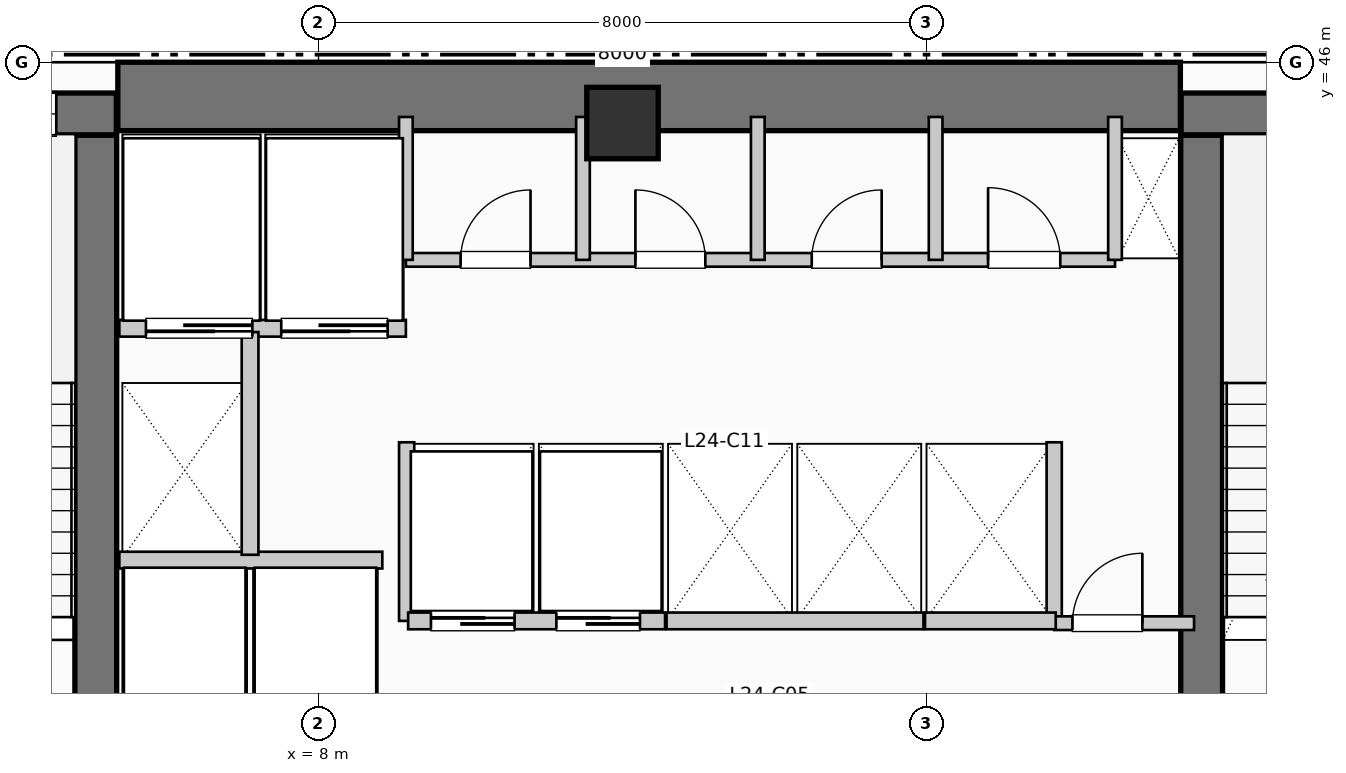
"""IFC4 building model, lengths in metres.
Left out: names, types, materials, properties, quantities, classifications, styles, units other than length and angle.
Written with IfcOpenShell. Run it as: python <this file> out.ifc"""

import sys

from ifc_helpers import new_model, si_unit, direction, frame, frame_2d, origin, origin_2d, place, context, subcontext, project, spatial, rectangle, extrude, element, fill, save


model = new_model("IFC4")
c1 = context("Model", 3, precision=1e-05, world=origin(), true_north=direction((0.0, 1.0)))
c2 = subcontext(c1, "Body", "Model", "MODEL_VIEW")
j1 = project(units=[si_unit("LENGTHUNIT", "METRE"), si_unit("PLANEANGLEUNIT", "RADIAN")], contexts=[c1])
p1 = place(None, origin())
s1 = spatial("IfcSite", under=j1, at=p1, CompositionType="ELEMENT")
p2 = place(p1, origin())
s2 = spatial("IfcBuilding", under=s1, at=p2, CompositionType="ELEMENT")
p3 = place(p2, frame((0.0, 0.0, 102.63)))
s3 = spatial("IfcBuildingStorey", under=s2, at=p3, CompositionType="ELEMENT", Elevation=102.63)
p4 = place(p3, frame((5.36, 45.55, 0.0), z_axis=(0.0, 0.0, 1.0), x_axis=(1.0, 0.0, 0.0)))
e1 = element("IfcWall", 1, at=p4, inside=s3, PredefinedType="SHEAR", context=c2, shape_type="SweptSolid", body=[
    extrude(rectangle(XDim=13.98, YDim=0.9, at=frame_2d((6.99, 0.0))), origin(), (0.0, 0.0, 1.0), 3.96),
])
p5 = place(p3, frame((5.07, 37.15, 0.0), z_axis=(0.0, 0.0, 1.0), x_axis=(0.0, 1.0, 0.0)))
e2 = element("IfcWall", 2, at=p5, inside=s3, PredefinedType="SHEAR", context=c2, shape_type="SweptSolid", body=[
    extrude(rectangle(XDim=7.89, YDim=0.55, at=frame_2d((3.945, 0.0))), origin(), (0.0, 0.0, 1.0), 3.96),
])
p6 = place(p3, frame((1.1, 45.32, 0.0), z_axis=(0.0, 0.0, 1.0), x_axis=(1.0, 0.0, 0.0)))
e3 = element("IfcWall", 3, at=p6, inside=s3, PredefinedType="SHEAR", context=c2, shape_type="SweptSolid", body=[
    extrude(rectangle(XDim=4.24, YDim=0.55, at=frame_2d((2.12, 0.0))), origin(), (0.0, 0.0, 1.0), 3.96),
])
p7 = place(p6, frame((2.05, 0.0, 1.05)))
e4 = element("IfcOpeningElement", 4, at=p7, cuts=e3, PredefinedType="OPENING", context=c2, shape_type="SweptSolid", body=[
    extrude(rectangle(XDim=1.4, YDim=1.8, at=frame_2d((0.7, 0.9))), frame((0.0, 0.285, 0.0), z_axis=(0.0, -1.0, 0.0), x_axis=(1.0, 0.0, 0.0)), (0.0, 0.0, 1.0), 0.57),
])
p8 = place(p3, frame((19.62, 37.15, 0.0), z_axis=(0.0, 0.0, 1.0), x_axis=(0.0, 1.0, 0.0)))
e5 = element("IfcWall", 5, at=p8, inside=s3, PredefinedType="SHEAR", context=c2, shape_type="SweptSolid", body=[
    extrude(rectangle(XDim=7.89, YDim=0.55, at=frame_2d((3.945, 0.0))), origin(), (0.0, 0.0, 1.0), 3.96),
])
p9 = place(p3, frame((19.35, 45.32, 0.0), z_axis=(0.0, 0.0, 1.0), x_axis=(1.0, 0.0, 0.0)))
e6 = element("IfcWall", 6, at=p9, inside=s3, PredefinedType="SHEAR", context=c2, shape_type="SweptSolid", body=[
    extrude(rectangle(XDim=3.69, YDim=0.55, at=frame_2d((1.845, 0.0))), origin(), (0.0, 0.0, 1.0), 3.96),
])
p10 = place(p9, frame((1.15, 0.0, 1.05)))
e7 = element("IfcOpeningElement", 7, at=p10, cuts=e6, PredefinedType="OPENING", context=c2, shape_type="SweptSolid", body=[
    extrude(rectangle(XDim=1.4, YDim=1.8, at=frame_2d((0.7, 0.9))), frame((0.0, 0.285, 0.0), z_axis=(0.0, -1.0, 0.0), x_axis=(1.0, 0.0, 0.0)), (0.0, 0.0, 1.0), 0.57),
])
p11 = place(p3, frame((12.0, 45.2, 0.0), z_axis=(0.0, 0.0, 1.0), x_axis=(1.0, 0.0, 0.0)))
e8 = element("IfcColumn", 8, at=p11, inside=s3, PredefinedType="COLUMN", context=c2, shape_type="SweptSolid", body=[
    extrude(rectangle(XDim=0.94, YDim=0.94, at=origin_2d()), origin(), (0.0, 0.0, 1.0), 3.96),
])
p12 = place(p3, frame((5.38, 39.45, 0.0), z_axis=(0.0, 0.0, 1.0), x_axis=(1.0, 0.0, 0.0)))
e9 = element("IfcWall", 9, at=p12, inside=s3, PredefinedType="PARTITIONING", context=c2, shape_type="SweptSolid", body=[
    extrude(rectangle(XDim=3.46, YDim=0.22, at=frame_2d((1.73, 0.0))), origin(), (0.0, 0.0, 1.0), 3.71),
])
p13 = place(p3, frame((5.38, 42.5, 0.0), z_axis=(0.0, 0.0, 1.0), x_axis=(1.0, 0.0, 0.0)))
e10 = element("IfcWall", 10, at=p13, inside=s3, PredefinedType="PARTITIONING", context=c2, shape_type="SweptSolid", body=[
    extrude(rectangle(XDim=3.77, YDim=0.22, at=frame_2d((1.885, 0.0))), origin(), (0.0, 0.0, 1.0), 3.71),
])
p14 = place(p13, frame((1.75, 0.0, 0.0), z_axis=(0.0, 0.0, 1.0), x_axis=(-1.0, 0.0, 0.0)))
e11 = element("IfcOpeningElement", 11, at=p14, cuts=e10, PredefinedType="OPENING", context=c2, shape_type="SweptSolid", body=[
    extrude(rectangle(XDim=1.4, YDim=2.2, at=frame_2d((0.7, 1.1))), frame((0.0, 0.12, 0.0), z_axis=(0.0, -1.0, 0.0), x_axis=(1.0, 0.0, 0.0)), (0.0, 0.0, 1.0), 0.24),
])
p15 = place(p13, frame((3.53, 0.0, 0.0), z_axis=(0.0, 0.0, 1.0), x_axis=(-1.0, 0.0, 0.0)))
e12 = element("IfcOpeningElement", 12, at=p15, cuts=e10, PredefinedType="OPENING", context=c2, shape_type="SweptSolid", body=[
    extrude(rectangle(XDim=1.4, YDim=2.2, at=frame_2d((0.7, 1.1))), frame((0.0, 0.12, 0.0), z_axis=(0.0, -1.0, 0.0), x_axis=(1.0, 0.0, 0.0)), (0.0, 0.0, 1.0), 0.24),
])
p16 = place(p3, frame((7.1, 39.52, 0.0), z_axis=(0.0, 0.0, 1.0), x_axis=(0.0, 1.0, 0.0)))
e13 = element("IfcWall", 13, at=p16, inside=s3, PredefinedType="PARTITIONING", context=c2, shape_type="SweptSolid", body=[
    extrude(rectangle(XDim=2.93, YDim=0.22, at=frame_2d((1.465, 0.0))), origin(), (0.0, 0.0, 1.0), 3.71),
])
for number, where, z_axis, x_axis in (
    (14, (9.16, 38.65, 0.0), (0.0, 0.0, 1.0), (0.0, 1.0, 0.0)),
    (15, (17.68, 38.65, 0.0), (0.0, 0.0, 1.0), (0.0, 1.0, 0.0)),
):
    element("IfcWall", number, at=place(p3, frame(where, z_axis=z_axis, x_axis=x_axis)), inside=s3, PredefinedType="PARTITIONING", context=c2, shape_type="SweptSolid", body=[
        extrude(rectangle(XDim=2.35, YDim=0.2, at=frame_2d((1.175, 0.0))), origin(), (0.0, 0.0, 1.0), 3.71),
    ])
p17 = place(p3, frame((17.68, 38.62, 0.0), z_axis=(0.0, 0.0, 1.0), x_axis=(1.0, 0.0, 0.0)))
e16 = element("IfcWall", 16, at=p17, inside=s3, PredefinedType="PARTITIONING", context=c2, shape_type="SweptSolid", body=[
    extrude(rectangle(XDim=1.84, YDim=0.18, at=frame_2d((0.92, 0.0))), origin(), (0.0, 0.0, 1.0), 3.71),
])
p18 = place(p17, frame((0.24, 0.0, 0.0)))
e17 = element("IfcOpeningElement", 17, at=p18, cuts=e16, PredefinedType="OPENING", context=c2, shape_type="SweptSolid", body=[
    extrude(rectangle(XDim=0.92, YDim=2.1, at=frame_2d((0.46, 1.05))), frame((0.0, 0.1, 0.0), z_axis=(0.0, -1.0, 0.0), x_axis=(1.0, 0.0, 0.0)), (0.0, 0.0, 1.0), 0.2),
])
p19 = place(p3, frame((9.18, 38.65, 0.0), z_axis=(0.0, 0.0, 1.0), x_axis=(1.0, 0.0, 0.0)))
e18 = element("IfcWall", 18, at=p19, inside=s3, PredefinedType="PARTITIONING", context=c2, shape_type="SweptSolid", body=[
    extrude(rectangle(XDim=3.38, YDim=0.22, at=frame_2d((1.69, 0.0))), origin(), (0.0, 0.0, 1.0), 3.71),
])
p20 = place(p19, frame((0.3, 0.0, 0.0)))
e19 = element("IfcOpeningElement", 19, at=p20, cuts=e18, PredefinedType="OPENING", context=c2, shape_type="SweptSolid", body=[
    extrude(rectangle(XDim=1.1, YDim=2.2, at=frame_2d((0.55, 1.1))), frame((0.0, 0.12, 0.0), z_axis=(0.0, -1.0, 0.0), x_axis=(1.0, 0.0, 0.0)), (0.0, 0.0, 1.0), 0.24),
])
p21 = place(p19, frame((1.95, 0.0, 0.0)))
e20 = element("IfcOpeningElement", 20, at=p21, cuts=e18, PredefinedType="OPENING", context=c2, shape_type="SweptSolid", body=[
    extrude(rectangle(XDim=1.1, YDim=2.2, at=frame_2d((0.55, 1.1))), frame((0.0, 0.12, 0.0), z_axis=(0.0, -1.0, 0.0), x_axis=(1.0, 0.0, 0.0)), (0.0, 0.0, 1.0), 0.24),
])
p22 = place(p3, frame((12.58, 38.65, 0.0), z_axis=(0.0, 0.0, 1.0), x_axis=(1.0, 0.0, 0.0)))
e21 = element("IfcWall", 21, at=p22, inside=s3, PredefinedType="PARTITIONING", context=c2, shape_type="SweptSolid", body=[
    extrude(rectangle(XDim=3.38, YDim=0.22, at=frame_2d((1.69, 0.0))), origin(), (0.0, 0.0, 1.0), 3.71),
])
p23 = place(p3, frame((15.98, 38.65, 0.0), z_axis=(0.0, 0.0, 1.0), x_axis=(1.0, 0.0, 0.0)))
e22 = element("IfcWall", 22, at=p23, inside=s3, PredefinedType="PARTITIONING", context=c2, shape_type="SweptSolid", body=[
    extrude(rectangle(XDim=1.72, YDim=0.22, at=frame_2d((0.86, 0.0))), origin(), (0.0, 0.0, 1.0), 3.71),
])
p24 = place(p3, frame((9.15, 43.4, 0.0), z_axis=(0.0, 0.0, 1.0), x_axis=(1.0, 0.0, 0.0)))
e23 = element("IfcWall", 23, at=p24, inside=s3, PredefinedType="PLUMBINGWALL", context=c2, shape_type="SweptSolid", body=[
    extrude(rectangle(XDim=9.33, YDim=0.18, at=frame_2d((4.665, 0.0))), origin(), (0.0, 0.0, 1.0), 3.71),
])
p25 = place(p24, frame((0.72, 0.0, 0.0)))
e24 = element("IfcOpeningElement", 24, at=p25, cuts=e23, PredefinedType="OPENING", context=c2, shape_type="SweptSolid", body=[
    extrude(rectangle(XDim=0.92, YDim=2.1, at=frame_2d((0.46, 1.05))), frame((0.0, 0.1, 0.0), z_axis=(0.0, -1.0, 0.0), x_axis=(1.0, 0.0, 0.0)), (0.0, 0.0, 1.0), 0.2),
])
p26 = place(p24, frame((3.02, 0.0, 0.0)))
e25 = element("IfcOpeningElement", 25, at=p26, cuts=e23, PredefinedType="OPENING", context=c2, shape_type="SweptSolid", body=[
    extrude(rectangle(XDim=0.92, YDim=2.1, at=frame_2d((0.46, 1.05))), frame((0.0, 0.1, 0.0), z_axis=(0.0, -1.0, 0.0), x_axis=(1.0, 0.0, 0.0)), (0.0, 0.0, 1.0), 0.2),
])
p27 = place(p24, frame((5.34, 0.0, 0.0)))
e26 = element("IfcOpeningElement", 26, at=p27, cuts=e23, PredefinedType="OPENING", context=c2, shape_type="SweptSolid", body=[
    extrude(rectangle(XDim=0.92, YDim=2.1, at=frame_2d((0.46, 1.05))), frame((0.0, 0.1, 0.0), z_axis=(0.0, -1.0, 0.0), x_axis=(1.0, 0.0, 0.0)), (0.0, 0.0, 1.0), 0.2),
])
p28 = place(p24, frame((7.66, 0.0, 0.0)))
e27 = element("IfcOpeningElement", 27, at=p28, cuts=e23, PredefinedType="OPENING", context=c2, shape_type="SweptSolid", body=[
    extrude(rectangle(XDim=0.95, YDim=2.1, at=frame_2d((0.475, 1.05))), frame((0.0, 0.1, 0.0), z_axis=(0.0, -1.0, 0.0), x_axis=(1.0, 0.0, 0.0)), (0.0, 0.0, 1.0), 0.2),
])
for number, where, z_axis, x_axis in (
    (28, (9.15, 43.4, 0.0), (0.0, 0.0, 1.0), (0.0, 1.0, 0.0)),
    (29, (18.48, 43.4, 0.0), (0.0, 0.0, 1.0), (0.0, 1.0, 0.0)),
    (30, (11.48, 43.4, 0.0), (0.0, 0.0, 1.0), (0.0, 1.0, 0.0)),
    (31, (13.78, 43.4, 0.0), (0.0, 0.0, 1.0), (0.0, 1.0, 0.0)),
    (32, (16.12, 43.4, 0.0), (0.0, 0.0, 1.0), (0.0, 1.0, 0.0)),
):
    element("IfcWall", number, at=place(p3, frame(where, z_axis=z_axis, x_axis=x_axis)), inside=s3, PredefinedType="PLUMBINGWALL", context=c2, shape_type="SweptSolid", body=[
        extrude(rectangle(XDim=1.88, YDim=0.18, at=frame_2d((0.94, 0.0))), origin(), (0.0, 0.0, 1.0), 3.71),
    ])
p29 = place(p7, origin())
e33 = element("IfcWindow", 33, at=p29, inside=s3, PartitioningType="SINGLE_PANEL", PredefinedType="WINDOW", context=c2, shape_type="SweptSolid", body=[
    extrude(rectangle(XDim=1.4, YDim=1.8, at=frame_2d((0.7, 0.9))), frame((0.0, 0.03, 0.0), z_axis=(0.0, -1.0, 0.0), x_axis=(1.0, 0.0, 0.0)), (0.0, 0.0, 1.0), 0.06),
])
fill(e4, e33)
p30 = place(p14, origin())
e34 = element("IfcDoor", 34, at=p30, inside=s3, OperationType="SLIDING_TO_LEFT", PredefinedType="DOOR", context=c2, shape_type="SweptSolid", body=[
    extrude(rectangle(XDim=1.4, YDim=2.2, at=frame_2d((0.7, 1.1))), frame((0.0, 0.025, 0.0), z_axis=(0.0, -1.0, 0.0), x_axis=(1.0, 0.0, 0.0)), (0.0, 0.0, 1.0), 0.05),
])
fill(e11, e34)
p31 = place(p15, origin())
e35 = element("IfcDoor", 35, at=p31, inside=s3, OperationType="SLIDING_TO_LEFT", PredefinedType="DOOR", context=c2, shape_type="SweptSolid", body=[
    extrude(rectangle(XDim=1.4, YDim=2.2, at=frame_2d((0.7, 1.1))), frame((0.0, 0.025, 0.0), z_axis=(0.0, -1.0, 0.0), x_axis=(1.0, 0.0, 0.0)), (0.0, 0.0, 1.0), 0.05),
])
fill(e12, e35)
p32 = place(p18, origin())
e36 = element("IfcDoor", 36, at=p32, inside=s3, OperationType="SINGLE_SWING_RIGHT", PredefinedType="DOOR", context=c2, shape_type="SweptSolid", body=[
    extrude(rectangle(XDim=0.92, YDim=2.1, at=frame_2d((0.46, 1.05))), frame((0.0, 0.025, 0.0), z_axis=(0.0, -1.0, 0.0), x_axis=(1.0, 0.0, 0.0)), (0.0, 0.0, 1.0), 0.05),
])
fill(e17, e36)
p33 = place(p20, origin())
e37 = element("IfcDoor", 37, at=p33, inside=s3, OperationType="SLIDING_TO_LEFT", PredefinedType="DOOR", context=c2, shape_type="SweptSolid", body=[
    extrude(rectangle(XDim=1.1, YDim=2.2, at=frame_2d((0.55, 1.1))), frame((0.0, 0.025, 0.0), z_axis=(0.0, -1.0, 0.0), x_axis=(1.0, 0.0, 0.0)), (0.0, 0.0, 1.0), 0.05),
])
fill(e19, e37)
p34 = place(p21, origin())
e38 = element("IfcDoor", 38, at=p34, inside=s3, OperationType="SLIDING_TO_LEFT", PredefinedType="DOOR", context=c2, shape_type="SweptSolid", body=[
    extrude(rectangle(XDim=1.1, YDim=2.2, at=frame_2d((0.55, 1.1))), frame((0.0, 0.025, 0.0), z_axis=(0.0, -1.0, 0.0), x_axis=(1.0, 0.0, 0.0)), (0.0, 0.0, 1.0), 0.05),
])
fill(e20, e38)
p35 = place(p25, origin())
e39 = element("IfcDoor", 39, at=p35, inside=s3, OperationType="SINGLE_SWING_RIGHT", PredefinedType="DOOR", context=c2, shape_type="SweptSolid", body=[
    extrude(rectangle(XDim=0.92, YDim=2.1, at=frame_2d((0.46, 1.05))), frame((0.0, 0.025, 0.0), z_axis=(0.0, -1.0, 0.0), x_axis=(1.0, 0.0, 0.0)), (0.0, 0.0, 1.0), 0.05),
])
fill(e24, e39)
p36 = place(p26, origin())
e40 = element("IfcDoor", 40, at=p36, inside=s3, OperationType="SINGLE_SWING_LEFT", PredefinedType="DOOR", context=c2, shape_type="SweptSolid", body=[
    extrude(rectangle(XDim=0.92, YDim=2.1, at=frame_2d((0.46, 1.05))), frame((0.0, 0.025, 0.0), z_axis=(0.0, -1.0, 0.0), x_axis=(1.0, 0.0, 0.0)), (0.0, 0.0, 1.0), 0.05),
])
fill(e25, e40)
p37 = place(p27, origin())
e41 = element("IfcDoor", 41, at=p37, inside=s3, OperationType="SINGLE_SWING_RIGHT", PredefinedType="DOOR", context=c2, shape_type="SweptSolid", body=[
    extrude(rectangle(XDim=0.92, YDim=2.1, at=frame_2d((0.46, 1.05))), frame((0.0, 0.025, 0.0), z_axis=(0.0, -1.0, 0.0), x_axis=(1.0, 0.0, 0.0)), (0.0, 0.0, 1.0), 0.05),
])
fill(e26, e41)
p38 = place(p28, origin())
e42 = element("IfcDoor", 42, at=p38, inside=s3, OperationType="SINGLE_SWING_LEFT", PredefinedType="DOOR", context=c2, shape_type="SweptSolid", body=[
    extrude(rectangle(XDim=0.95, YDim=2.1, at=frame_2d((0.475, 1.05))), frame((0.0, 0.025, 0.0), z_axis=(0.0, -1.0, 0.0), x_axis=(1.0, 0.0, 0.0)), (0.0, 0.0, 1.0), 0.05),
])
fill(e27, e42)
save(model, sys.argv[1])
